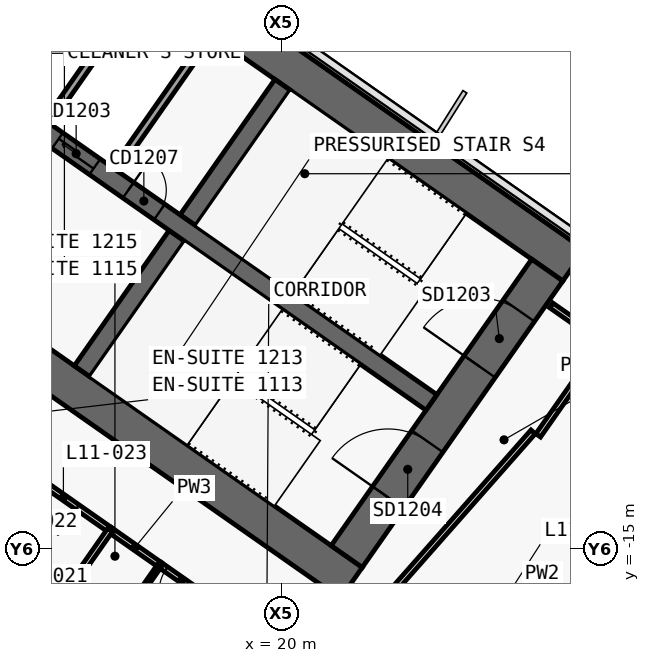
"""IFC4 building model, lengths in metres.
Left out: names, types, materials, properties, quantities, classifications, styles, units other than length and angle.
Written with IfcOpenShell. Run it as: python <this file> out.ifc"""

import sys

from ifc_helpers import new_model, si_unit, direction, frame, frame_2d, origin, place, context, subcontext, project, spatial, polyline, rectangle, outline, extrude, element, fill, save


model = new_model("IFC4")
c1 = context("Model", 3, precision=1e-05, world=origin(), true_north=direction((0.0, 1.0)))
c2 = subcontext(c1, "Body", "Model", "MODEL_VIEW")
j1 = project(units=[si_unit("LENGTHUNIT", "METRE"), si_unit("PLANEANGLEUNIT", "RADIAN")], contexts=[c1])
p1 = place(None, origin())
s1 = spatial("IfcSite", under=j1, at=p1, CompositionType="ELEMENT")
p2 = place(p1, origin())
s2 = spatial("IfcBuilding", under=s1, at=p2, CompositionType="ELEMENT")
p3 = place(p2, frame((0.0, 0.0, 65.3)))
s3 = spatial("IfcBuildingStorey", under=s2, at=p3, CompositionType="ELEMENT", Elevation=65.3)
p4 = place(p3, frame((-0.037, 11.867, 0.0), z_axis=(0.0, 0.0, 1.0), x_axis=(0.819155306259, -0.573571777746, 0.0)))
e1 = element("IfcWall", 1, at=p4, inside=s3, PredefinedType="SHEAR", context=c2, shape_type="SweptSolid", body=[
    extrude(outline(polyline([(33.837, 0.5), (0.0, 0.5), (0.7, -0.5), (33.837, -0.5), (33.837, 0.5)])), origin(), (0.0, 0.0, 1.0), 3.6),
])
p5 = place(p3, frame((-0.037, -0.585, 0.0), z_axis=(0.0, 0.0, 1.0), x_axis=(0.819157152511, -0.573569140985, 0.0)))
e2 = element("IfcWall", 2, at=p5, inside=s3, PredefinedType="SHEAR", context=c2, shape_type="SweptSolid", body=[
    extrude(outline(polyline([(26.695, 0.5), (0.0, 0.5), (0.7, -0.5), (26.695, -0.5), (26.695, 0.5)])), origin(), (0.0, 0.0, 1.0), 3.6),
])
p6 = place(p5, frame((1.245, 0.0, 0.0)))
e3 = element("IfcOpeningElement", 3, at=p6, cuts=e2, PredefinedType="OPENING", context=c2, shape_type="SweptSolid", body=[
    extrude(rectangle(XDim=1.5, YDim=2.1, at=frame_2d((0.75, 1.05))), frame((0.0, 0.51, 0.0), z_axis=(0.0, -1.0, 0.0), x_axis=(1.0, 0.0, 0.0)), (0.0, 0.0, 1.0), 1.02),
])
p7 = place(p5, frame((12.445, 0.0, 0.0)))
e4 = element("IfcOpeningElement", 4, at=p7, cuts=e2, PredefinedType="OPENING", context=c2, shape_type="SweptSolid", body=[
    extrude(rectangle(XDim=1.5, YDim=2.1, at=frame_2d((0.75, 1.05))), frame((0.0, 0.51, 0.0), z_axis=(0.0, -1.0, 0.0), x_axis=(1.0, 0.0, 0.0)), (0.0, 0.0, 1.0), 1.02),
])
p8 = place(p3, frame((21.708, -15.2, 0.0), z_axis=(0.0, 0.0, 1.0), x_axis=(0.573576324356, 0.819152122709, 0.0)))
e5 = element("IfcWall", 5, at=p8, inside=s3, PredefinedType="SHEAR", context=c2, shape_type="SweptSolid", body=[
    extrude(outline(polyline([(9.2, 0.5), (0.0, 0.5), (0.0, -0.5), (9.2, -0.5), (9.2, 0.5)])), origin(), (0.0, 0.0, 1.0), 3.6),
])
p9 = place(p8, frame((6.1, 0.0, 0.0)))
e6 = element("IfcOpeningElement", 6, at=p9, cuts=e5, PredefinedType="OPENING", context=c2, shape_type="SweptSolid", body=[
    extrude(rectangle(XDim=1.8, YDim=2.1, at=frame_2d((0.9, 1.05))), frame((0.0, 0.51, 0.0), z_axis=(0.0, -1.0, 0.0), x_axis=(1.0, 0.0, 0.0)), (0.0, 0.0, 1.0), 1.02),
])
p10 = place(p8, frame((1.9, 0.0, 0.0)))
e7 = element("IfcOpeningElement", 7, at=p10, cuts=e5, PredefinedType="OPENING", context=c2, shape_type="SweptSolid", body=[
    extrude(rectangle(XDim=1.8, YDim=2.1, at=frame_2d((0.9, 1.05))), frame((0.0, 0.51, 0.0), z_axis=(0.0, -1.0, 0.0), x_axis=(1.0, 0.0, 0.0)), (0.0, 0.0, 1.0), 1.02),
])
p11 = place(p3, frame((14.745, -10.324, 0.0), z_axis=(0.0, 0.0, 1.0), x_axis=(0.57356780395, 0.819158088694, 0.0)))
e8 = element("IfcWall", 8, at=p11, inside=s3, PredefinedType="SHEAR", context=c2, shape_type="SweptSolid", body=[
    extrude(outline(polyline([(0.0, 0.25), (0.0, -0.25), (4.35, -0.25), (4.35, 0.25), (0.0, 0.25)])), origin(), (0.0, 0.0, 1.0), 3.6),
])
p12 = place(p3, frame((17.527, -6.352, 0.0), z_axis=(0.0, 0.0, 1.0), x_axis=(0.573530143085, 0.819184457233, 0.0)))
e9 = element("IfcWall", 9, at=p12, inside=s3, PredefinedType="SHEAR", context=c2, shape_type="SweptSolid", body=[
    extrude(outline(polyline([(4.35, -0.25), (4.35, 0.25), (0.0, 0.25), (0.0, -0.25), (4.35, -0.25)])), origin(), (0.0, 0.0, 1.0), 3.6),
])
p13 = place(p3, frame((2.638, 3.768, 0.0), z_axis=(0.0, 0.0, 1.0), x_axis=(0.819148977158, -0.573580816643, 0.0)))
e10 = element("IfcWall", 10, at=p13, inside=s3, PredefinedType="SHEAR", context=c2, shape_type="SweptSolid", body=[
    extrude(outline(polyline([(0.0, 0.25), (0.0, -0.25), (26.0, -0.25), (26.0, 0.25), (0.0, 0.25)])), origin(), (0.0, 0.0, 1.0), 3.6),
])
p14 = place(p13, frame((9.637, 0.0, 0.0)))
e11 = element("IfcOpeningElement", 11, at=p14, cuts=e10, PredefinedType="OPENING", context=c2, shape_type="SweptSolid", body=[
    extrude(rectangle(XDim=1.2, YDim=2.1, at=frame_2d((0.6, 1.05))), frame((0.0, 0.26, 0.0), z_axis=(0.0, -1.0, 0.0), x_axis=(1.0, 0.0, 0.0)), (0.0, 0.0, 1.0), 0.52),
])
p15 = place(p13, frame((11.812, 0.0, 0.0)))
e12 = element("IfcOpeningElement", 12, at=p15, cuts=e10, PredefinedType="OPENING", context=c2, shape_type="SweptSolid", body=[
    extrude(rectangle(XDim=1.2, YDim=2.1, at=frame_2d((0.6, 1.05))), frame((0.0, 0.26, 0.0), z_axis=(0.0, -1.0, 0.0), x_axis=(1.0, 0.0, 0.0)), (0.0, 0.0, 1.0), 0.52),
])
p16 = place(p13, frame((13.988, 0.0, 0.0)))
e13 = element("IfcOpeningElement", 13, at=p16, cuts=e10, PredefinedType="OPENING", context=c2, shape_type="SweptSolid", body=[
    extrude(rectangle(XDim=1.2, YDim=2.1, at=frame_2d((0.6, 1.05))), frame((0.0, 0.26, 0.0), z_axis=(0.0, -1.0, 0.0), x_axis=(1.0, 0.0, 0.0)), (0.0, 0.0, 1.0), 0.52),
])
p17 = place(p13, frame((16.262, 0.0, 0.0)))
e14 = element("IfcOpeningElement", 14, at=p17, cuts=e10, PredefinedType="OPENING", context=c2, shape_type="SweptSolid", body=[
    extrude(rectangle(XDim=1.0, YDim=2.1, at=frame_2d((0.5, 1.05))), frame((0.0, 0.26, 0.0), z_axis=(0.0, -1.0, 0.0), x_axis=(1.0, 0.0, 0.0)), (0.0, 0.0, 1.0), 0.52),
])
p18 = place(p3, frame((12.059, -2.523, 0.0), z_axis=(0.0, 0.0, 1.0), x_axis=(0.573594173421, 0.819139624372, 0.0)))
e15 = element("IfcWall", 15, at=p18, inside=s3, PredefinedType="SOLIDWALL", context=c2, shape_type="SweptSolid", body=[
    extrude(rectangle(XDim=4.35, YDim=0.2, at=frame_2d((2.175, 0.0))), origin(), (0.0, 0.0, 1.0), 3.6),
])
p19 = place(p3, frame((13.84, -3.771, 0.0), z_axis=(0.0, 0.0, 1.0), x_axis=(0.57356780395, 0.819158088694, 0.0)))
e16 = element("IfcWall", 16, at=p19, inside=s3, PredefinedType="SOLIDWALL", context=c2, shape_type="SweptSolid", body=[
    extrude(rectangle(XDim=4.35, YDim=0.2, at=frame_2d((2.175, 0.0))), origin(), (0.0, 0.0, 1.0), 3.6),
])
p20 = place(p3, frame((15.622, -5.018, 0.0), z_axis=(0.0, 0.0, 1.0), x_axis=(0.573594173421, 0.819139624372, 0.0)))
e17 = element("IfcWall", 17, at=p20, inside=s3, PredefinedType="SOLIDWALL", context=c2, shape_type="SweptSolid", body=[
    extrude(rectangle(XDim=4.35, YDim=0.2, at=frame_2d((2.175, 0.0))), origin(), (0.0, 0.0, 1.0), 3.6),
])
p21 = place(p3, frame((15.483, -14.504, 0.0), z_axis=(0.0, 0.0, 1.0), x_axis=(-0.81916700466, 0.573555070134, 0.0)))
e18 = element("IfcWall", 18, at=p21, inside=s3, PredefinedType="PARTITIONING", context=c2, shape_type="SweptSolid", body=[
    extrude(rectangle(XDim=3.004, YDim=0.15, at=frame_2d((1.502, 0.0))), origin(), (0.0, 0.0, 1.0), 2.6),
])
p22 = place(p21, frame((1.052, 0.0, 0.0)))
e19 = element("IfcOpeningElement", 19, at=p22, cuts=e18, PredefinedType="OPENING", context=c2, shape_type="SweptSolid", body=[
    extrude(rectangle(XDim=0.9, YDim=2.1, at=frame_2d((0.45, 1.05))), frame((0.0, 0.085, 0.0), z_axis=(0.0, -1.0, 0.0), x_axis=(1.0, 0.0, 0.0)), (0.0, 0.0, 1.0), 0.17),
])
p23 = place(p3, frame((17.941, -16.224, 0.0), z_axis=(0.0, 0.0, 1.0), x_axis=(-0.819199220913, 0.573509055252, 0.0)))
e20 = element("IfcWall", 20, at=p23, inside=s3, PredefinedType="PARTITIONING", context=c2, shape_type="SweptSolid", body=[
    extrude(rectangle(XDim=1.403, YDim=0.15, at=frame_2d((0.702, 0.0))), origin(), (0.0, 0.0, 1.0), 3.32),
])
p24 = place(p23, frame((0.202, 0.0, 0.0)))
e21 = element("IfcOpeningElement", 21, at=p24, cuts=e20, PredefinedType="OPENING", context=c2, shape_type="SweptSolid", body=[
    extrude(rectangle(XDim=1.0, YDim=2.1, at=frame_2d((0.5, 1.05))), frame((0.0, 0.085, 0.0), z_axis=(0.0, -1.0, 0.0), x_axis=(1.0, 0.0, 0.0)), (0.0, 0.0, 1.0), 0.17),
])
p25 = place(p3, frame((16.794, -15.421, 0.0), z_axis=(0.0, 0.0, 1.0), x_axis=(-0.819189013667, 0.573523634986, 0.0)))
e22 = element("IfcWall", 22, at=p25, inside=s3, PredefinedType="PARTITIONING", context=c2, shape_type="SweptSolid", body=[
    extrude(rectangle(XDim=1.604, YDim=0.15, at=frame_2d((0.802, 0.0))), origin(), (0.0, 0.0, 1.0), 3.32),
])
p26 = place(p3, frame((22.285, -16.825, 0.0), z_axis=(0.0, 0.0, 1.0), x_axis=(0.661551268245, 0.749899939647, 0.0)))
e23 = element("IfcWall", 23, at=p26, inside=s3, PredefinedType="PARTITIONING", context=c2, shape_type="SweptSolid", body=[
    extrude(rectangle(XDim=6.541, YDim=0.15, at=frame_2d((3.271, 0.0))), origin(), (0.0, 0.0, 1.0), 2.6),
])
p27 = place(p3, frame((26.746, -12.014, 0.0), z_axis=(0.0, 0.0, 1.0), x_axis=(0.573560650686, 0.819163097304, 0.0)))
e24 = element("IfcWall", 24, at=p27, inside=s3, PredefinedType="PARTITIONING", context=c2, shape_type="SweptSolid", body=[
    extrude(rectangle(XDim=3.0, YDim=0.15, at=frame_2d((1.5, 0.0))), origin(), (0.0, 0.0, 1.0), 3.32),
])
p28 = place(p3, frame((28.467, -9.556, 0.0), z_axis=(0.0, 0.0, 1.0), x_axis=(-0.819109000826, 0.573637903879, 0.0)))
e25 = element("IfcWall", 25, at=p28, inside=s3, PredefinedType="PARTITIONING", context=c2, shape_type="SweptSolid", body=[
    extrude(rectangle(XDim=1.68, YDim=0.15, at=frame_2d((0.84, 0.0))), origin(), (0.0, 0.0, 1.0), 3.32),
])
p29 = place(p3, frame((15.481, -14.503, 0.0), z_axis=(0.0, 0.0, 1.0), x_axis=(-0.573588285102, -0.819143747577, 0.0)))
e26 = element("IfcWall", 26, at=p29, inside=s3, PredefinedType="PARTITIONING", context=c2, shape_type="SweptSolid", body=[
    extrude(rectangle(XDim=2.602, YDim=0.15, at=frame_2d((1.301, 0.0))), origin(), (0.0, 0.0, 1.0), 3.32),
])
p30 = place(p3, frame((15.302, -17.551, 0.0), z_axis=(0.0, 0.0, 1.0), x_axis=(0.573600972199, 0.819134863556, 0.0)))
e27 = element("IfcWall", 27, at=p30, inside=s3, PredefinedType="PARTITIONING", context=c2, shape_type="SweptSolid", body=[
    extrude(rectangle(XDim=2.6, YDim=0.12, at=frame_2d((1.3, 0.0))), origin(), (0.0, 0.0, 1.0), 3.32),
])
p31 = place(p30, frame((0.875, 0.0, 0.0)))
e28 = element("IfcOpeningElement", 28, at=p31, cuts=e27, PredefinedType="OPENING", context=c2, shape_type="SweptSolid", body=[
    extrude(rectangle(XDim=0.85, YDim=2.05, at=frame_2d((0.425, 1.025))), frame((0.0, 0.07, 0.0), z_axis=(0.0, -1.0, 0.0), x_axis=(1.0, 0.0, 0.0)), (0.0, 0.0, 1.0), 0.14),
])
p32 = place(p16, origin())
e29 = element("IfcDoor", 29, at=p32, inside=s3, OperationType="SLIDING_TO_LEFT", PredefinedType="DOOR", context=c2, shape_type="SweptSolid", body=[
    extrude(rectangle(XDim=1.2, YDim=2.1, at=frame_2d((0.6, 1.05))), frame((0.0, 0.025, 0.0), z_axis=(0.0, -1.0, 0.0), x_axis=(1.0, 0.0, 0.0)), (0.0, 0.0, 1.0), 0.05),
])
fill(e13, e29)
p33 = place(p17, origin())
e30 = element("IfcDoor", 30, at=p33, inside=s3, OperationType="SINGLE_SWING_RIGHT", PredefinedType="DOOR", context=c2, shape_type="SweptSolid", body=[
    extrude(rectangle(XDim=1.0, YDim=2.1, at=frame_2d((0.5, 1.05))), frame((0.0, 0.025, 0.0), z_axis=(0.0, -1.0, 0.0), x_axis=(1.0, 0.0, 0.0)), (0.0, 0.0, 1.0), 0.05),
])
fill(e14, e30)
p34 = place(p9, origin())
e31 = element("IfcDoor", 31, at=p34, inside=s3, OperationType="DOUBLE_DOOR_SINGLE_SWING", PredefinedType="DOOR", context=c2, shape_type="SweptSolid", body=[
    extrude(rectangle(XDim=1.8, YDim=2.1, at=frame_2d((0.9, 1.05))), frame((0.0, 0.025, 0.0), z_axis=(0.0, -1.0, 0.0), x_axis=(1.0, 0.0, 0.0)), (0.0, 0.0, 1.0), 0.05),
])
fill(e6, e31)
p35 = place(p10, origin())
e32 = element("IfcDoor", 32, at=p35, inside=s3, OperationType="DOUBLE_DOOR_SINGLE_SWING", PredefinedType="DOOR", context=c2, shape_type="SweptSolid", body=[
    extrude(rectangle(XDim=1.8, YDim=2.1, at=frame_2d((0.9, 1.05))), frame((0.0, 0.025, 0.0), z_axis=(0.0, -1.0, 0.0), x_axis=(1.0, 0.0, 0.0)), (0.0, 0.0, 1.0), 0.05),
])
fill(e7, e32)
p36 = place(p22, origin())
e33 = element("IfcDoor", 33, at=p36, inside=s3, OperationType="SINGLE_SWING_RIGHT", PredefinedType="DOOR", context=c2, shape_type="SweptSolid", body=[
    extrude(rectangle(XDim=0.9, YDim=2.1, at=frame_2d((0.45, 1.05))), frame((0.0, 0.025, 0.0), z_axis=(0.0, -1.0, 0.0), x_axis=(1.0, 0.0, 0.0)), (0.0, 0.0, 1.0), 0.05),
])
fill(e19, e33)
p37 = place(p24, origin())
e34 = element("IfcDoor", 34, at=p37, inside=s3, OperationType="SINGLE_SWING_RIGHT", PredefinedType="DOOR", context=c2, shape_type="SweptSolid", body=[
    extrude(rectangle(XDim=1.0, YDim=2.1, at=frame_2d((0.5, 1.05))), frame((0.0, 0.025, 0.0), z_axis=(0.0, -1.0, 0.0), x_axis=(1.0, 0.0, 0.0)), (0.0, 0.0, 1.0), 0.05),
])
fill(e21, e34)
save(model, sys.argv[1])
